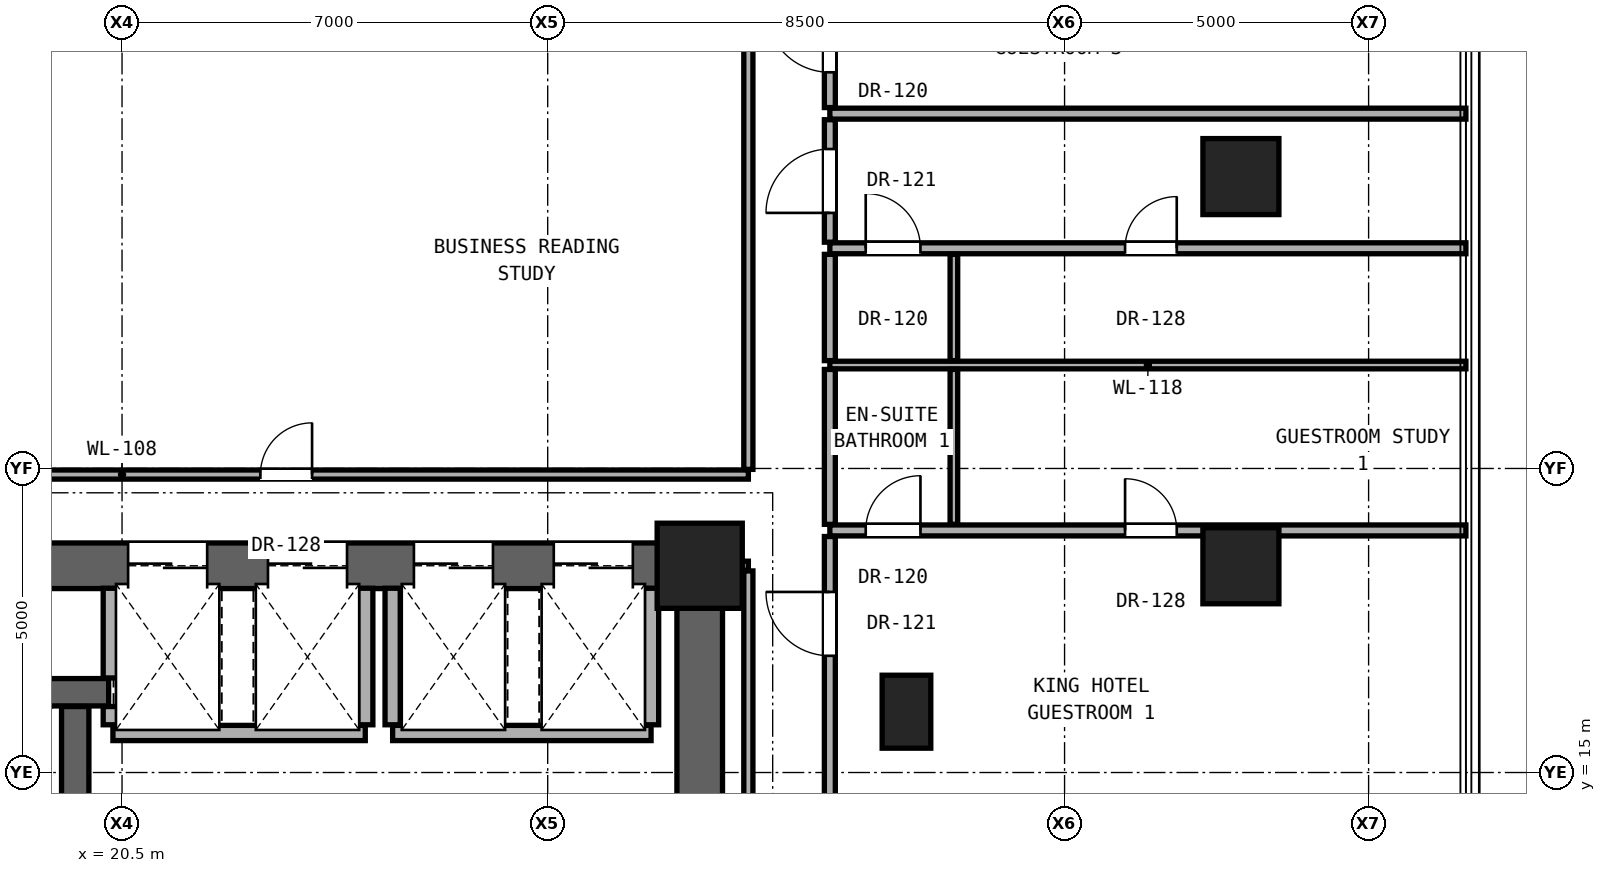
"""IFC4 building model, lengths in metres.
Left out: names, types, materials, properties, quantities, classifications, styles, units other than length and angle.
Written with IfcOpenShell. Run it as: python <this file> out.ifc"""

import sys

from ifc_helpers import new_model, si_unit, direction, frame, frame_2d, origin, origin_2d, place, context, subcontext, project, spatial, rectangle, hollow_rectangle, extrude, element, fill, save


model = new_model("IFC4")
c1 = context("Model", 3, precision=1e-05, world=origin(), true_north=direction((0.0, 1.0)))
c2 = subcontext(c1, "Body", "Model", "MODEL_VIEW")
j1 = project(units=[si_unit("LENGTHUNIT", "METRE"), si_unit("PLANEANGLEUNIT", "RADIAN")], contexts=[c1])
p1 = place(None, origin())
s1 = spatial("IfcSite", under=j1, at=p1, CompositionType="ELEMENT")
p2 = place(p1, origin())
s2 = spatial("IfcBuilding", under=s1, at=p2, CompositionType="ELEMENT")
p3 = place(p2, frame((0.0, 0.0, 35.6)))
s3 = spatial("IfcBuildingStorey", under=s2, at=p3, CompositionType="ELEMENT", Elevation=35.6)
p4 = place(p3, frame((30.0, 18.4, 0.0), z_axis=(0.0, 0.0, 1.0), x_axis=(1.0, 0.0, 0.0)))
e1 = element("IfcColumn", 1, at=p4, inside=s3, PredefinedType="COLUMN", context=c2, shape_type="SweptSolid", body=[
    extrude(rectangle(XDim=1.4, YDim=1.4, at=origin_2d()), origin(), (0.0, 0.0, 1.0), 3.3),
])
for number, where, z_axis, x_axis in (
    (2, (38.9, 18.4, 0.0), (0.0, 0.0, 1.0), (1.0, 0.0, 0.0)),
    (3, (38.9, 24.8, 0.0), (0.0, 0.0, 1.0), (1.0, 0.0, 0.0)),
):
    element("IfcColumn", number, at=place(p3, frame(where, z_axis=z_axis, x_axis=x_axis)), inside=s3, PredefinedType="COLUMN", context=c2, shape_type="SweptSolid", body=[
        extrude(hollow_rectangle(XDim=1.25, YDim=1.25, WallThickness=0.07, at=origin_2d()), origin(), (0.0, 0.0, 1.0), 3.3),
    ])
p5 = place(p3, frame((33.4, 16.0, 0.0), z_axis=(0.0, 0.0, 1.0), x_axis=(1.0, 0.0, 0.0)))
e4 = element("IfcColumn", 4, at=p5, inside=s3, PredefinedType="PILASTER", context=c2, shape_type="SweptSolid", body=[
    extrude(rectangle(XDim=0.8, YDim=1.2, at=origin_2d()), origin(), (0.0, 0.0, 1.0), 3.3),
])
p6 = place(p3, frame((30.0, 12.4, 0.0), z_axis=(0.0, 0.0, 1.0), x_axis=(0.0, 1.0, 0.0)))
e5 = element("IfcWall", 5, at=p6, inside=s3, PredefinedType="SHEAR", context=c2, shape_type="SweptSolid", body=[
    extrude(rectangle(XDim=6.0, YDim=0.75, at=frame_2d((3.0, 0.0))), origin(), (0.0, 0.0, 1.0), 3.06),
])
p7 = place(p3, frame((11.0, 18.4, 0.0), z_axis=(0.0, 0.0, 1.0), x_axis=(1.0, 0.0, 0.0)))
e6 = element("IfcWall", 6, at=p7, inside=s3, PredefinedType="SHEAR", context=c2, shape_type="SweptSolid", body=[
    extrude(rectangle(XDim=19.0, YDim=0.75, at=frame_2d((9.5, 0.0))), origin(), (0.0, 0.0, 1.0), 3.06),
])
p8 = place(p7, frame((4.175, 0.0, 0.0)))
e7 = element("IfcOpeningElement", 7, at=p8, cuts=e6, PredefinedType="OPENING", context=c2, shape_type="SweptSolid", body=[
    extrude(rectangle(XDim=1.2, YDim=2.25, at=frame_2d((0.6, 1.125))), frame((0.0, 0.385, 0.0), z_axis=(0.0, -1.0, 0.0), x_axis=(1.0, 0.0, 0.0)), (0.0, 0.0, 1.0), 0.77),
])
p9 = place(p7, frame((9.6, 0.0, 0.0)))
e8 = element("IfcOpeningElement", 8, at=p9, cuts=e6, PredefinedType="OPENING", context=c2, shape_type="SweptSolid", body=[
    extrude(rectangle(XDim=1.3, YDim=2.3, at=frame_2d((0.65, 1.15))), frame((0.0, 0.385, 0.0), z_axis=(0.0, -1.0, 0.0), x_axis=(1.0, 0.0, 0.0)), (0.0, 0.0, 1.0), 0.77),
])
p10 = place(p7, frame((11.9, 0.0, 0.0)))
e9 = element("IfcOpeningElement", 9, at=p10, cuts=e6, PredefinedType="OPENING", context=c2, shape_type="SweptSolid", body=[
    extrude(rectangle(XDim=1.3, YDim=2.3, at=frame_2d((0.65, 1.15))), frame((0.0, 0.385, 0.0), z_axis=(0.0, -1.0, 0.0), x_axis=(1.0, 0.0, 0.0)), (0.0, 0.0, 1.0), 0.77),
])
p11 = place(p7, frame((14.3, 0.0, 0.0)))
e10 = element("IfcOpeningElement", 10, at=p11, cuts=e6, PredefinedType="OPENING", context=c2, shape_type="SweptSolid", body=[
    extrude(rectangle(XDim=1.3, YDim=2.3, at=frame_2d((0.65, 1.15))), frame((0.0, 0.385, 0.0), z_axis=(0.0, -1.0, 0.0), x_axis=(1.0, 0.0, 0.0)), (0.0, 0.0, 1.0), 0.77),
])
p12 = place(p7, frame((16.6, 0.0, 0.0)))
e11 = element("IfcOpeningElement", 11, at=p12, cuts=e6, PredefinedType="OPENING", context=c2, shape_type="SweptSolid", body=[
    extrude(rectangle(XDim=1.3, YDim=2.3, at=frame_2d((0.65, 1.15))), frame((0.0, 0.385, 0.0), z_axis=(0.0, -1.0, 0.0), x_axis=(1.0, 0.0, 0.0)), (0.0, 0.0, 1.0), 0.77),
])
p13 = place(p3, frame((20.35, 15.65, 0.0), z_axis=(0.0, 0.0, 1.0), x_axis=(1.0, 0.0, 0.0)))
e12 = element("IfcWall", 12, at=p13, inside=s3, PredefinedType="SOLIDWALL", context=c2, shape_type="SweptSolid", body=[
    extrude(rectangle(XDim=4.15, YDim=0.25, at=frame_2d((2.075, 0.0))), origin(), (0.0, 0.0, 1.0), 3.06),
])
p14 = place(p3, frame((24.95, 15.65, 0.0), z_axis=(0.0, 0.0, 1.0), x_axis=(1.0, 0.0, 0.0)))
e13 = element("IfcWall", 13, at=p14, inside=s3, PredefinedType="SOLIDWALL", context=c2, shape_type="SweptSolid", body=[
    extrude(rectangle(XDim=4.25, YDim=0.25, at=frame_2d((2.125, 0.0))), origin(), (0.0, 0.0, 1.0), 3.06),
])
p15 = place(p3, frame((11.37, 16.32, 0.0), z_axis=(0.0, 0.0, 1.0), x_axis=(1.0, 0.0, 0.0)))
e14 = element("IfcWall", 14, at=p15, inside=s3, PredefinedType="SHEAR", context=c2, shape_type="SweptSolid", body=[
    extrude(rectangle(XDim=8.91, YDim=0.45, at=frame_2d((4.455, 0.0))), origin(), (0.0, 0.0, 1.0), 3.06),
])
p16 = place(p15, frame((0.47, 0.0, 0.0)))
e15 = element("IfcOpeningElement", 15, at=p16, cuts=e14, PredefinedType="OPENING", context=c2, shape_type="SweptSolid", body=[
    extrude(rectangle(XDim=1.15, YDim=2.2, at=frame_2d((0.575, 1.1))), frame((0.0, 0.235, 0.0), z_axis=(0.0, -1.0, 0.0), x_axis=(1.0, 0.0, 0.0)), (0.0, 0.0, 1.0), 0.47),
])
p17 = place(p3, frame((30.37, 18.4, 0.0), z_axis=(0.0, 0.0, 1.0), x_axis=(1.0, 0.0, 0.0)))
e16 = element("IfcWall", 16, at=p17, inside=s3, PredefinedType="PARTITIONING", context=c2, shape_type="SweptSolid", body=[
    extrude(rectangle(XDim=0.43, YDim=0.15, at=frame_2d((0.215, 0.0))), origin(), (0.0, 0.0, 1.0), 2.436),
])
p18 = place(p3, frame((32.14, 18.981, 0.0), z_axis=(0.0, 0.0, 1.0), x_axis=(1.0, 0.0, 0.0)))
e17 = element("IfcWall", 17, at=p18, inside=s3, PredefinedType="PARTITIONING", context=c2, shape_type="SweptSolid", body=[
    extrude(rectangle(XDim=10.46, YDim=0.18, at=frame_2d((5.23, 0.0))), origin(), (0.0, 0.0, 1.0), 2.125),
])
p19 = place(p18, frame((4.855, 0.0, 0.0)))
e18 = element("IfcOpeningElement", 18, at=p19, cuts=e17, PredefinedType="OPENING", context=c2, shape_type="SweptSolid", body=[
    extrude(rectangle(XDim=0.85, YDim=2.01, at=frame_2d((0.425, 1.005))), frame((0.0, 0.1, 0.0), z_axis=(0.0, -1.0, 0.0), x_axis=(1.0, 0.0, 0.0)), (0.0, 0.0, 1.0), 0.2),
])
p20 = place(p18, frame((0.59, 0.0, 0.0)))
e19 = element("IfcOpeningElement", 19, at=p20, cuts=e17, PredefinedType="OPENING", context=c2, shape_type="SweptSolid", body=[
    extrude(rectangle(XDim=0.9, YDim=2.1, at=frame_2d((0.45, 1.05))), frame((0.0, 0.1, 0.0), z_axis=(0.0, -1.0, 0.0), x_axis=(1.0, 0.0, 0.0)), (0.0, 0.0, 1.0), 0.2),
])
p21 = place(p3, frame((10.2, 19.9, 0.0), z_axis=(0.0, 0.0, 1.0), x_axis=(1.0, 0.0, 0.0)))
e20 = element("IfcWall", 20, at=p21, inside=s3, PredefinedType="PARTITIONING", context=c2, shape_type="SweptSolid", body=[
    extrude(rectangle(XDim=20.6, YDim=0.15, at=frame_2d((10.3, 0.0))), origin(), (0.0, 0.0, 1.0), 2.104),
])
p22 = place(p21, frame((1.695, 0.0, 0.0)))
e21 = element("IfcOpeningElement", 21, at=p22, cuts=e20, PredefinedType="OPENING", context=c2, shape_type="SweptSolid", body=[
    extrude(rectangle(XDim=0.85, YDim=2.01, at=frame_2d((0.425, 1.005))), frame((0.0, 0.085, 0.0), z_axis=(0.0, -1.0, 0.0), x_axis=(1.0, 0.0, 0.0)), (0.0, 0.0, 1.0), 0.17),
])
p23 = place(p21, frame((3.795, 0.0, 0.0)))
e22 = element("IfcOpeningElement", 22, at=p23, cuts=e20, PredefinedType="OPENING", context=c2, shape_type="SweptSolid", body=[
    extrude(rectangle(XDim=0.85, YDim=2.01, at=frame_2d((0.425, 1.005))), frame((0.0, 0.085, 0.0), z_axis=(0.0, -1.0, 0.0), x_axis=(1.0, 0.0, 0.0)), (0.0, 0.0, 1.0), 0.17),
])
p24 = place(p21, frame((12.575, 0.0, 0.0)))
e23 = element("IfcOpeningElement", 23, at=p24, cuts=e20, PredefinedType="OPENING", context=c2, shape_type="SweptSolid", body=[
    extrude(rectangle(XDim=0.85, YDim=2.01, at=frame_2d((0.425, 1.005))), frame((0.0, 0.085, 0.0), z_axis=(0.0, -1.0, 0.0), x_axis=(1.0, 0.0, 0.0)), (0.0, 0.0, 1.0), 0.17),
])
p25 = place(p3, frame((32.14, 21.701, 0.0), z_axis=(0.0, 0.0, 1.0), x_axis=(1.0, 0.0, 0.0)))
e24 = element("IfcWall", 24, at=p25, inside=s3, PredefinedType="PARTITIONING", context=c2, shape_type="SweptSolid", body=[
    extrude(rectangle(XDim=10.46, YDim=0.125, at=frame_2d((5.23, 0.0))), origin(), (0.0, 0.0, 1.0), 2.125),
])
p26 = place(p3, frame((32.14, 23.621, 0.0), z_axis=(0.0, 0.0, 1.0), x_axis=(1.0, 0.0, 0.0)))
e25 = element("IfcWall", 25, at=p26, inside=s3, PredefinedType="PARTITIONING", context=c2, shape_type="SweptSolid", body=[
    extrude(rectangle(XDim=10.46, YDim=0.18, at=frame_2d((5.23, 0.0))), origin(), (0.0, 0.0, 1.0), 2.125),
])
p27 = place(p26, frame((4.855, 0.0, 0.0)))
e26 = element("IfcOpeningElement", 26, at=p27, cuts=e25, PredefinedType="OPENING", context=c2, shape_type="SweptSolid", body=[
    extrude(rectangle(XDim=0.85, YDim=2.01, at=frame_2d((0.425, 1.005))), frame((0.0, 0.1, 0.0), z_axis=(0.0, -1.0, 0.0), x_axis=(1.0, 0.0, 0.0)), (0.0, 0.0, 1.0), 0.2),
])
p28 = place(p26, frame((0.59, 0.0, 0.0)))
e27 = element("IfcOpeningElement", 27, at=p28, cuts=e25, PredefinedType="OPENING", context=c2, shape_type="SweptSolid", body=[
    extrude(rectangle(XDim=0.9, YDim=2.1, at=frame_2d((0.45, 1.05))), frame((0.0, 0.1, 0.0), z_axis=(0.0, -1.0, 0.0), x_axis=(1.0, 0.0, 0.0)), (0.0, 0.0, 1.0), 0.2),
])
p29 = place(p3, frame((32.14, 25.835, 0.0), z_axis=(0.0, 0.0, 1.0), x_axis=(1.0, 0.0, 0.0)))
e28 = element("IfcWall", 28, at=p29, inside=s3, PredefinedType="PARTITIONING", context=c2, shape_type="SweptSolid", body=[
    extrude(rectangle(XDim=10.46, YDim=0.18, at=frame_2d((5.23, 0.0))), origin(), (0.0, 0.0, 1.0), 2.125),
])
p30 = place(p3, frame((19.73, 13.355, 0.0), z_axis=(0.0, 0.0, 1.0), x_axis=(0.0, 1.0, 0.0)))
e29 = element("IfcWall", 29, at=p30, inside=s3, PredefinedType="SHEAR", context=c2, shape_type="SweptSolid", body=[
    extrude(rectangle(XDim=2.73, YDim=0.45, at=frame_2d((1.365, 0.0))), origin(), (0.0, 0.0, 1.0), 3.06),
])
p31 = place(p3, frame((20.315, 15.785, 0.0), z_axis=(0.0, 0.0, 1.0), x_axis=(0.0, 1.0, 0.0)))
e30 = element("IfcWall", 30, at=p31, inside=s3, PredefinedType="SOLIDWALL", context=c2, shape_type="SweptSolid", body=[
    extrude(rectangle(XDim=0.3, YDim=0.25, at=frame_2d((0.15, 0.0))), origin(), (0.0, 0.0, 1.0), 3.06),
])
p32 = place(p3, frame((20.315, 16.555, 0.0), z_axis=(0.0, 0.0, 1.0), x_axis=(0.0, 1.0, 0.0)))
e31 = element("IfcWall", 31, at=p32, inside=s3, PredefinedType="SOLIDWALL", context=c2, shape_type="SweptSolid", body=[
    extrude(rectangle(XDim=1.475, YDim=0.25, at=frame_2d((0.738, 0.0))), origin(), (0.0, 0.0, 1.0), 3.06),
])
for number, where, z_axis, x_axis in (
    (32, (24.5, 15.785, 0.0), (0.0, 0.0, 1.0), (0.0, 1.0, 0.0)),
    (33, (24.95, 15.785, 0.0), (0.0, 0.0, 1.0), (0.0, 1.0, 0.0)),
    (34, (29.2, 15.785, 0.0), (0.0, 0.0, 1.0), (0.0, 1.0, 0.0)),
):
    element("IfcWall", number, at=place(p3, frame(where, z_axis=z_axis, x_axis=x_axis)), inside=s3, PredefinedType="SOLIDWALL", context=c2, shape_type="SweptSolid", body=[
        extrude(rectangle(XDim=2.245, YDim=0.25, at=frame_2d((1.123, 0.0))), origin(), (0.0, 0.0, 1.0), 3.06),
    ])
p33 = place(p3, frame((30.8, 12.335, 0.0), z_axis=(0.0, 0.0, 1.0), x_axis=(0.0, 1.0, 0.0)))
e35 = element("IfcWall", 35, at=p33, inside=s3, PredefinedType="PARTITIONING", context=c2, shape_type="SweptSolid", body=[
    extrude(rectangle(XDim=5.98, YDim=0.15, at=frame_2d((2.99, 0.0))), origin(), (0.0, 0.0, 1.0), 2.436),
])
p34 = place(p3, frame((30.8, 19.985, 0.0), z_axis=(0.0, 0.0, 1.0), x_axis=(0.0, 1.0, 0.0)))
e36 = element("IfcWall", 36, at=p34, inside=s3, PredefinedType="PARTITIONING", context=c2, shape_type="SweptSolid", body=[
    extrude(rectangle(XDim=6.958, YDim=0.15, at=frame_2d((3.479, 0.0))), origin(), (0.0, 0.0, 1.0), 2.279),
])
p35 = place(p3, frame((32.14, 14.108, 0.0), z_axis=(0.0, 0.0, 1.0), x_axis=(0.0, 1.0, 0.0)))
e37 = element("IfcWall", 37, at=p35, inside=s3, PredefinedType="PARTITIONING", context=c2, shape_type="SweptSolid", body=[
    extrude(rectangle(XDim=4.773, YDim=0.18, at=frame_2d((2.387, 0.0))), origin(), (0.0, 0.0, 1.0), 2.436),
])
p36 = place(p35, frame((2.812, 0.0, 0.0)))
e38 = element("IfcOpeningElement", 38, at=p36, cuts=e37, PredefinedType="OPENING", context=c2, shape_type="SweptSolid", body=[
    extrude(rectangle(XDim=1.05, YDim=2.2, at=frame_2d((0.525, 1.1))), frame((0.0, 0.1, 0.0), z_axis=(0.0, -1.0, 0.0), x_axis=(1.0, 0.0, 0.0)), (0.0, 0.0, 1.0), 0.2),
])
p37 = place(p3, frame((32.14, 19.081, 0.0), z_axis=(0.0, 0.0, 1.0), x_axis=(0.0, 1.0, 0.0)))
e39 = element("IfcWall", 39, at=p37, inside=s3, PredefinedType="PARTITIONING", context=c2, shape_type="SweptSolid", body=[
    extrude(rectangle(XDim=2.547, YDim=0.18, at=frame_2d((1.274, 0.0))), origin(), (0.0, 0.0, 1.0), 3.06),
])
p38 = place(p3, frame((32.14, 21.773, 0.0), z_axis=(0.0, 0.0, 1.0), x_axis=(0.0, 1.0, 0.0)))
e40 = element("IfcWall", 40, at=p38, inside=s3, PredefinedType="PARTITIONING", context=c2, shape_type="SweptSolid", body=[
    extrude(rectangle(XDim=1.748, YDim=0.18, at=frame_2d((0.874, 0.0))), origin(), (0.0, 0.0, 1.0), 3.06),
])
p39 = place(p3, frame((32.14, 23.721, 0.0), z_axis=(0.0, 0.0, 1.0), x_axis=(0.0, 1.0, 0.0)))
e41 = element("IfcWall", 41, at=p39, inside=s3, PredefinedType="PARTITIONING", context=c2, shape_type="SweptSolid", body=[
    extrude(rectangle(XDim=2.014, YDim=0.18, at=frame_2d((1.007, 0.0))), origin(), (0.0, 0.0, 1.0), 2.279),
])
p40 = place(p39, frame((0.482, 0.0, 0.0)))
e42 = element("IfcOpeningElement", 42, at=p40, cuts=e41, PredefinedType="OPENING", context=c2, shape_type="SweptSolid", body=[
    extrude(rectangle(XDim=1.05, YDim=2.2, at=frame_2d((0.525, 1.1))), frame((0.0, 0.1, 0.0), z_axis=(0.0, -1.0, 0.0), x_axis=(1.0, 0.0, 0.0)), (0.0, 0.0, 1.0), 0.2),
])
p41 = place(p3, frame((32.14, 25.935, 0.0), z_axis=(0.0, 0.0, 1.0), x_axis=(0.0, 1.0, 0.0)))
e43 = element("IfcWall", 43, at=p41, inside=s3, PredefinedType="PARTITIONING", context=c2, shape_type="SweptSolid", body=[
    extrude(rectangle(XDim=2.21, YDim=0.18, at=frame_2d((1.105, 0.0))), origin(), (0.0, 0.0, 1.0), 3.06),
])
p42 = place(p41, frame((0.58, 0.0, 0.0)))
e44 = element("IfcOpeningElement", 44, at=p42, cuts=e43, PredefinedType="OPENING", context=c2, shape_type="SweptSolid", body=[
    extrude(rectangle(XDim=1.05, YDim=2.2, at=frame_2d((0.525, 1.1))), frame((0.0, 0.1, 0.0), z_axis=(0.0, -1.0, 0.0), x_axis=(1.0, 0.0, 0.0)), (0.0, 0.0, 1.0), 0.2),
])
p43 = place(p3, frame((34.18, 19.081, 0.0), z_axis=(0.0, 0.0, 1.0), x_axis=(0.0, 1.0, 0.0)))
e45 = element("IfcWall", 45, at=p43, inside=s3, PredefinedType="PARTITIONING", context=c2, shape_type="SweptSolid", body=[
    extrude(rectangle(XDim=2.547, YDim=0.125, at=frame_2d((1.274, 0.0))), origin(), (0.0, 0.0, 1.0), 3.06),
])
p44 = place(p3, frame((34.18, 21.773, 0.0), z_axis=(0.0, 0.0, 1.0), x_axis=(0.0, 1.0, 0.0)))
e46 = element("IfcWall", 46, at=p44, inside=s3, PredefinedType="PARTITIONING", context=c2, shape_type="SweptSolid", body=[
    extrude(rectangle(XDim=1.748, YDim=0.125, at=frame_2d((0.874, 0.0))), origin(), (0.0, 0.0, 1.0), 3.06),
])
p45 = place(p36, origin())
e47 = element("IfcDoor", 47, at=p45, inside=s3, OperationType="SINGLE_SWING_RIGHT", PredefinedType="DOOR", context=c2, shape_type="SweptSolid", body=[
    extrude(rectangle(XDim=1.05, YDim=2.2, at=frame_2d((0.525, 1.1))), frame((0.0, 0.025, 0.0), z_axis=(0.0, -1.0, 0.0), x_axis=(1.0, 0.0, 0.0)), (0.0, 0.0, 1.0), 0.05),
])
fill(e38, e47)
p46 = place(p19, origin())
e48 = element("IfcDoor", 48, at=p46, inside=s3, OperationType="SINGLE_SWING_LEFT", PredefinedType="DOOR", context=c2, shape_type="SweptSolid", body=[
    extrude(rectangle(XDim=0.85, YDim=2.01, at=frame_2d((0.425, 1.005))), frame((0.0, 0.025, 0.0), z_axis=(0.0, -1.0, 0.0), x_axis=(1.0, 0.0, 0.0)), (0.0, 0.0, 1.0), 0.05),
])
fill(e18, e48)
p47 = place(p20, origin())
e49 = element("IfcDoor", 49, at=p47, inside=s3, OperationType="SINGLE_SWING_RIGHT", PredefinedType="DOOR", context=c2, shape_type="SweptSolid", body=[
    extrude(rectangle(XDim=0.9, YDim=2.1, at=frame_2d((0.45, 1.05))), frame((0.0, 0.025, 0.0), z_axis=(0.0, -1.0, 0.0), x_axis=(1.0, 0.0, 0.0)), (0.0, 0.0, 1.0), 0.05),
])
fill(e19, e49)
p48 = place(p40, origin())
e50 = element("IfcDoor", 50, at=p48, inside=s3, OperationType="SINGLE_SWING_LEFT", PredefinedType="DOOR", context=c2, shape_type="SweptSolid", body=[
    extrude(rectangle(XDim=1.05, YDim=2.2, at=frame_2d((0.525, 1.1))), frame((0.0, 0.025, 0.0), z_axis=(0.0, -1.0, 0.0), x_axis=(1.0, 0.0, 0.0)), (0.0, 0.0, 1.0), 0.05),
])
fill(e42, e50)
p49 = place(p27, origin())
e51 = element("IfcDoor", 51, at=p49, inside=s3, OperationType="SINGLE_SWING_RIGHT", PredefinedType="DOOR", context=c2, shape_type="SweptSolid", body=[
    extrude(rectangle(XDim=0.85, YDim=2.01, at=frame_2d((0.425, 1.005))), frame((0.0, 0.025, 0.0), z_axis=(0.0, -1.0, 0.0), x_axis=(1.0, 0.0, 0.0)), (0.0, 0.0, 1.0), 0.05),
])
fill(e26, e51)
p50 = place(p28, origin())
e52 = element("IfcDoor", 52, at=p50, inside=s3, OperationType="SINGLE_SWING_LEFT", PredefinedType="DOOR", context=c2, shape_type="SweptSolid", body=[
    extrude(rectangle(XDim=0.9, YDim=2.1, at=frame_2d((0.45, 1.05))), frame((0.0, 0.025, 0.0), z_axis=(0.0, -1.0, 0.0), x_axis=(1.0, 0.0, 0.0)), (0.0, 0.0, 1.0), 0.05),
])
fill(e27, e52)
p51 = place(p42, origin())
e53 = element("IfcDoor", 53, at=p51, inside=s3, OperationType="SINGLE_SWING_RIGHT", PredefinedType="DOOR", context=c2, shape_type="SweptSolid", body=[
    extrude(rectangle(XDim=1.05, YDim=2.2, at=frame_2d((0.525, 1.1))), frame((0.0, 0.025, 0.0), z_axis=(0.0, -1.0, 0.0), x_axis=(1.0, 0.0, 0.0)), (0.0, 0.0, 1.0), 0.05),
])
fill(e44, e53)
p52 = place(p24, origin())
e54 = element("IfcDoor", 54, at=p52, inside=s3, OperationType="SINGLE_SWING_RIGHT", PredefinedType="DOOR", context=c2, shape_type="SweptSolid", body=[
    extrude(rectangle(XDim=0.85, YDim=2.01, at=frame_2d((0.425, 1.005))), frame((0.0, 0.025, 0.0), z_axis=(0.0, -1.0, 0.0), x_axis=(1.0, 0.0, 0.0)), (0.0, 0.0, 1.0), 0.05),
])
fill(e23, e54)
p53 = place(p9, origin())
e55 = element("IfcDoor", 55, at=p53, inside=s3, OperationType="DOUBLE_DOOR_SLIDING", PredefinedType="DOOR", context=c2, shape_type="SweptSolid", body=[
    extrude(rectangle(XDim=1.3, YDim=2.3, at=frame_2d((0.65, 1.15))), frame((0.0, 0.025, 0.0), z_axis=(0.0, -1.0, 0.0), x_axis=(1.0, 0.0, 0.0)), (0.0, 0.0, 1.0), 0.05),
])
fill(e8, e55)
p54 = place(p10, origin())
e56 = element("IfcDoor", 56, at=p54, inside=s3, OperationType="DOUBLE_DOOR_SLIDING", PredefinedType="DOOR", context=c2, shape_type="SweptSolid", body=[
    extrude(rectangle(XDim=1.3, YDim=2.3, at=frame_2d((0.65, 1.15))), frame((0.0, 0.025, 0.0), z_axis=(0.0, -1.0, 0.0), x_axis=(1.0, 0.0, 0.0)), (0.0, 0.0, 1.0), 0.05),
])
fill(e9, e56)
p55 = place(p11, origin())
e57 = element("IfcDoor", 57, at=p55, inside=s3, OperationType="DOUBLE_DOOR_SLIDING", PredefinedType="DOOR", context=c2, shape_type="SweptSolid", body=[
    extrude(rectangle(XDim=1.3, YDim=2.3, at=frame_2d((0.65, 1.15))), frame((0.0, 0.025, 0.0), z_axis=(0.0, -1.0, 0.0), x_axis=(1.0, 0.0, 0.0)), (0.0, 0.0, 1.0), 0.05),
])
fill(e10, e57)
p56 = place(p12, origin())
e58 = element("IfcDoor", 58, at=p56, inside=s3, OperationType="DOUBLE_DOOR_SLIDING", PredefinedType="DOOR", context=c2, shape_type="SweptSolid", body=[
    extrude(rectangle(XDim=1.3, YDim=2.3, at=frame_2d((0.65, 1.15))), frame((0.0, 0.025, 0.0), z_axis=(0.0, -1.0, 0.0), x_axis=(1.0, 0.0, 0.0)), (0.0, 0.0, 1.0), 0.05),
])
fill(e11, e58)
save(model, sys.argv[1])
